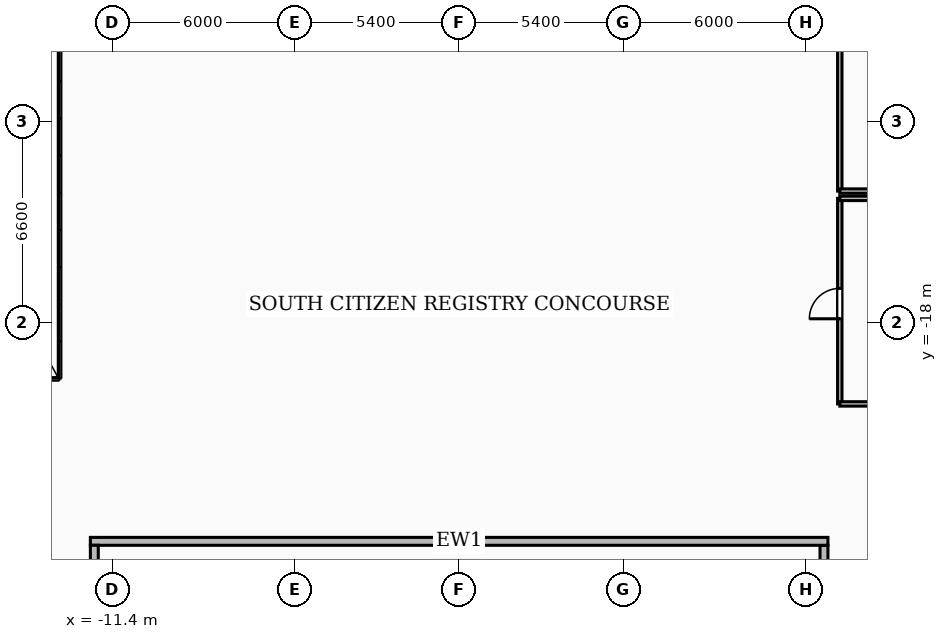
"""IFC4 building model, lengths in metres.
Left out: names, types, materials, properties, quantities, classifications, styles, units other than length and angle.
Written with IfcOpenShell. Run it as: python <this file> out.ifc"""

import sys

from ifc_helpers import new_model, si_unit, direction, frame, frame_2d, origin, place, context, subcontext, project, spatial, rectangle, extrude, element, fill, save


model = new_model("IFC4")
c1 = context("Model", 3, precision=1e-05, world=origin(), true_north=direction((0.0, 1.0)))
c2 = subcontext(c1, "Body", "Model", "MODEL_VIEW")
j1 = project(units=[si_unit("LENGTHUNIT", "METRE"), si_unit("PLANEANGLEUNIT", "RADIAN")], contexts=[c1])
p1 = place(None, origin())
s1 = spatial("IfcSite", under=j1, at=p1, CompositionType="ELEMENT")
p2 = place(p1, origin())
s2 = spatial("IfcBuilding", under=s1, at=p2, CompositionType="ELEMENT")
p3 = place(p2, frame((0.0, 0.0, 5.4)))
s3 = spatial("IfcBuildingStorey", under=s2, at=p3, CompositionType="ELEMENT", Elevation=5.4)
p4 = place(p3, frame((12.0, -27.34, 0.0), z_axis=(0.0, 0.0, 1.0), x_axis=(0.0, 1.0, 0.0)))
e1 = element("IfcWall", 1, at=p4, inside=s3, PredefinedType="SOLIDWALL", context=c2, shape_type="SweptSolid", body=[
    extrude(rectangle(XDim=2.01, YDim=0.26, at=frame_2d((1.005, 0.0))), origin(), (0.0, 0.0, 1.0), 3.37),
])
p5 = place(p3, frame((12.13, -25.2, 0.0), z_axis=(0.0, 0.0, 1.0), x_axis=(-1.0, 0.0, 0.0)))
e2 = element("IfcWall", 2, at=p5, inside=s3, PredefinedType="SOLIDWALL", context=c2, shape_type="SweptSolid", body=[
    extrude(rectangle(XDim=24.26, YDim=0.26, at=frame_2d((12.13, 0.0))), origin(), (0.0, 0.0, 1.0), 3.37),
])
p6 = place(p3, frame((-12.0, -25.33, 0.0), z_axis=(0.0, 0.0, 1.0), x_axis=(0.0, -1.0, 0.0)))
e3 = element("IfcWall", 3, at=p6, inside=s3, PredefinedType="SOLIDWALL", context=c2, shape_type="SweptSolid", body=[
    extrude(rectangle(XDim=2.01, YDim=0.26, at=frame_2d((1.005, 0.0))), origin(), (0.0, 0.0, 1.0), 3.37),
])
p7 = place(p3, frame((12.52, -13.68, 0.0), z_axis=(0.0, 0.0, 1.0), x_axis=(0.0, 1.0, 0.0)))
e4 = element("IfcWall", 4, at=p7, inside=s3, PredefinedType="PARTITIONING", context=c2, shape_type="SweptSolid", body=[
    extrude(rectangle(XDim=11.36, YDim=0.145, at=frame_2d((5.68, 0.0))), origin(), (0.0, 0.0, 1.0), 3.37),
])
p8 = place(p7, frame((5.1, 0.0, 0.0)))
e5 = element("IfcOpeningElement", 5, at=p8, cuts=e4, PredefinedType="OPENING", context=c2, shape_type="SweptSolid", body=[
    extrude(rectangle(XDim=1.0, YDim=2.1, at=frame_2d((0.5, 1.05))), frame((0.0, 0.083, 0.0), z_axis=(0.0, -1.0, 0.0), x_axis=(1.0, 0.0, 0.0)), (0.0, 0.0, 1.0), 0.165),
])
p9 = place(p3, frame((12.52, -13.68, 0.0), z_axis=(0.0, 0.0, 1.0), x_axis=(1.0, 0.0, 0.0)))
e6 = element("IfcWall", 6, at=p9, inside=s3, PredefinedType="PARTITIONING", context=c2, shape_type="SweptSolid", body=[
    extrude(rectangle(XDim=10.08, YDim=0.145, at=frame_2d((5.04, 0.0))), origin(), (0.0, 0.0, 1.0), 4.36),
])
p10 = place(p3, frame((12.52, -20.68, 0.0), z_axis=(0.0, 0.0, 1.0), x_axis=(0.0, 1.0, 0.0)))
e7 = element("IfcWall", 7, at=p10, inside=s3, PredefinedType="PARTITIONING", context=c2, shape_type="SweptSolid", body=[
    extrude(rectangle(XDim=6.76, YDim=0.145, at=frame_2d((3.38, 0.0))), origin(), (0.0, 0.0, 1.0), 4.36),
])
p11 = place(p10, frame((2.8, 0.0, 0.0)))
e8 = element("IfcOpeningElement", 8, at=p11, cuts=e7, PredefinedType="OPENING", context=c2, shape_type="SweptSolid", body=[
    extrude(rectangle(XDim=1.0, YDim=2.1, at=frame_2d((0.5, 1.05))), frame((0.0, 0.083, 0.0), z_axis=(0.0, -1.0, 0.0), x_axis=(1.0, 0.0, 0.0)), (0.0, 0.0, 1.0), 0.165),
])
for number, where, z_axis, x_axis in (
    (9, (12.52, -20.68, 0.0), (0.0, 0.0, 1.0), (1.0, 0.0, 0.0)),
    (10, (12.52, -13.92, 0.0), (0.0, 0.0, 1.0), (1.0, 0.0, 0.0)),
):
    element("IfcWall", number, at=place(p3, frame(where, z_axis=z_axis, x_axis=x_axis)), inside=s3, PredefinedType="PARTITIONING", context=c2, shape_type="SweptSolid", body=[
        extrude(rectangle(XDim=10.08, YDim=0.145, at=frame_2d((5.04, 0.0))), origin(), (0.0, 0.0, 1.0), 4.36),
    ])
p12 = place(p11, origin())
e11 = element("IfcDoor", 11, at=p12, inside=s3, OperationType="SINGLE_SWING_LEFT", PredefinedType="DOOR", context=c2, shape_type="SweptSolid", body=[
    extrude(rectangle(XDim=1.0, YDim=2.1, at=frame_2d((0.5, 1.05))), frame((0.0, 0.025, 0.0), z_axis=(0.0, -1.0, 0.0), x_axis=(1.0, 0.0, 0.0)), (0.0, 0.0, 1.0), 0.05),
])
fill(e8, e11)
save(model, sys.argv[1])
